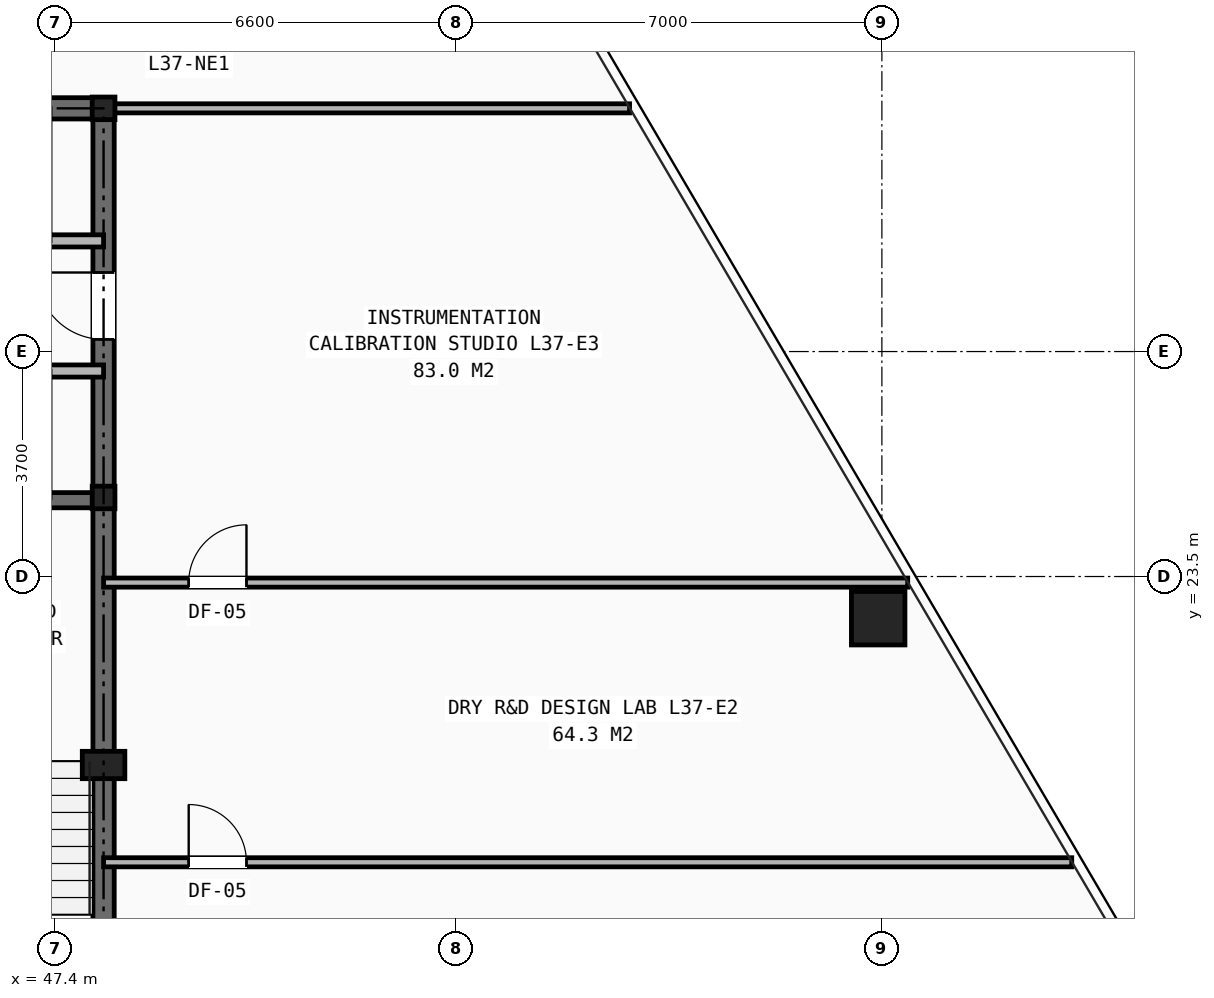
"""IFC4 building model, lengths in metres.
Left out: names, types, materials, properties, quantities, classifications, styles, units other than length and angle.
Written with IfcOpenShell. Run it as: python <this file> out.ifc"""

import sys

from ifc_helpers import new_model, si_unit, direction, frame, frame_2d, origin, origin_2d, place, context, subcontext, project, spatial, rectangle, hollow_rectangle, i_section, extrude, element, fill, save


model = new_model("IFC4")
c1 = context("Model", 3, precision=1e-05, world=origin(), true_north=direction((0.0, 1.0)))
c2 = subcontext(c1, "Body", "Model", "MODEL_VIEW")
j1 = project(units=[si_unit("LENGTHUNIT", "METRE"), si_unit("PLANEANGLEUNIT", "RADIAN")], contexts=[c1])
p1 = place(None, origin())
s1 = spatial("IfcSite", under=j1, at=p1, CompositionType="ELEMENT")
p2 = place(p1, origin())
s2 = spatial("IfcBuilding", under=s1, at=p2, CompositionType="ELEMENT")
p3 = place(p2, frame((0.0, 0.0, 129.8)))
s3 = spatial("IfcBuildingStorey", under=s2, at=p3, CompositionType="ELEMENT", Elevation=129.8)
for number, where, z_axis, x_axis in (
    (1, (48.2, 24.8, 0.0), (0.0, 0.0, 1.0), (1.0, 0.0, 0.0)),
    (2, (48.2, 31.2, 0.0), (0.0, 0.0, 1.0), (1.0, 0.0, 0.0)),
):
    element("IfcColumn", number, at=place(p3, frame(where, z_axis=z_axis, x_axis=x_axis)), inside=s3, PredefinedType="COLUMN", context=c2, shape_type="SweptSolid", body=[
        extrude(i_section(OverallWidth=0.374, OverallDepth=0.372, WebThickness=0.016, FlangeThickness=0.026, at=origin_2d()), origin(), (0.0, 0.0, 1.0), 3.45),
    ])
p4 = place(p3, frame((48.2, 20.4, 0.0), z_axis=(0.0, 0.0, 1.0), x_axis=(1.0, 0.0, 0.0)))
e3 = element("IfcColumn", 3, at=p4, inside=s3, PredefinedType="PILASTER", context=c2, shape_type="SweptSolid", body=[
    extrude(rectangle(XDim=0.7, YDim=0.45, at=origin_2d()), origin(), (0.0, 0.0, 1.0), 3.45),
])
p5 = place(p3, frame((60.939, 22.814, 0.0), z_axis=(0.0, 0.0, 1.0), x_axis=(1.0, 0.0, 0.0)))
e4 = element("IfcColumn", 4, at=p5, inside=s3, PredefinedType="COLUMN", context=c2, shape_type="SweptSolid", body=[
    extrude(hollow_rectangle(XDim=0.88, YDim=0.88, WallThickness=0.06, at=origin_2d()), origin(), (0.0, 0.0, 1.0), 3.45),
])
p6 = place(p3, frame((31.8, 31.2, 0.0), z_axis=(0.0, 0.0, 1.0), x_axis=(1.0, 0.0, 0.0)))
e5 = element("IfcWall", 5, at=p6, inside=s3, PredefinedType="SHEAR", context=c2, shape_type="SweptSolid", body=[
    extrude(rectangle(XDim=16.4, YDim=0.35, at=frame_2d((8.2, 0.0))), origin(), (0.0, 0.0, 1.0), 3.21),
])
p7 = place(p3, frame((48.2, 16.4, 0.0), z_axis=(0.0, 0.0, 1.0), x_axis=(0.0, 1.0, 0.0)))
e6 = element("IfcWall", 6, at=p7, inside=s3, PredefinedType="SHEAR", context=c2, shape_type="SweptSolid", body=[
    extrude(rectangle(XDim=14.8, YDim=0.35, at=frame_2d((7.4, 0.0))), origin(), (0.0, 0.0, 1.0), 3.21),
])
p8 = place(p7, frame((11.0, 0.0, 0.0)))
e7 = element("IfcOpeningElement", 7, at=p8, cuts=e6, PredefinedType="OPENING", context=c2, shape_type="SweptSolid", body=[
    extrude(rectangle(XDim=1.1, YDim=2.15, at=frame_2d((0.55, 1.075))), frame((0.0, 0.185, 0.0), z_axis=(0.0, -1.0, 0.0), x_axis=(1.0, 0.0, 0.0)), (0.0, 0.0, 1.0), 0.37),
])
p9 = place(p3, frame((44.955, 24.755, 0.0), z_axis=(0.0, 0.0, 1.0), x_axis=(1.0, 0.0, 0.0)))
e8 = element("IfcWall", 8, at=p9, inside=s3, PredefinedType="SHEAR", context=c2, shape_type="SweptSolid", body=[
    extrude(rectangle(XDim=3.245, YDim=0.25, at=frame_2d((1.623, 0.0))), origin(), (0.0, 0.0, 1.0), 3.21),
])
p10 = place(p3, frame((31.8, 29.02, 0.0), z_axis=(0.0, 0.0, 1.0), x_axis=(1.0, 0.0, 0.0)))
e9 = element("IfcWall", 9, at=p10, inside=s3, PredefinedType="SOLIDWALL", context=c2, shape_type="SweptSolid", body=[
    extrude(rectangle(XDim=16.4, YDim=0.2, at=frame_2d((8.2, 0.0))), origin(), (0.0, 0.0, 1.0), 2.661),
])
p11 = place(p10, frame((0.55, 0.0, 0.0)))
e10 = element("IfcOpeningElement", 10, at=p11, cuts=e9, PredefinedType="OPENING", context=c2, shape_type="SweptSolid", body=[
    extrude(rectangle(XDim=0.85, YDim=2.05, at=frame_2d((0.425, 1.025))), frame((0.0, 0.11, 0.0), z_axis=(0.0, -1.0, 0.0), x_axis=(1.0, 0.0, 0.0)), (0.0, 0.0, 1.0), 0.22),
])
p12 = place(p10, frame((5.94, 0.0, 0.0)))
e11 = element("IfcOpeningElement", 11, at=p12, cuts=e9, PredefinedType="OPENING", context=c2, shape_type="SweptSolid", body=[
    extrude(rectangle(XDim=0.9, YDim=2.1, at=frame_2d((0.45, 1.05))), frame((0.0, 0.11, 0.0), z_axis=(0.0, -1.0, 0.0), x_axis=(1.0, 0.0, 0.0)), (0.0, 0.0, 1.0), 0.22),
])
p13 = place(p3, frame((33.82, 26.88, 0.0), z_axis=(0.0, 0.0, 1.0), x_axis=(1.0, 0.0, 0.0)))
e12 = element("IfcWall", 12, at=p13, inside=s3, PredefinedType="SOLIDWALL", context=c2, shape_type="SweptSolid", body=[
    extrude(rectangle(XDim=14.38, YDim=0.2, at=frame_2d((7.19, 0.0))), origin(), (0.0, 0.0, 1.0), 2.661),
])
p14 = place(p13, frame((0.53, 0.0, 0.0)))
e13 = element("IfcOpeningElement", 13, at=p14, cuts=e12, PredefinedType="OPENING", context=c2, shape_type="SweptSolid", body=[
    extrude(rectangle(XDim=1.1, YDim=2.15, at=frame_2d((0.55, 1.075))), frame((0.0, 0.11, 0.0), z_axis=(0.0, -1.0, 0.0), x_axis=(1.0, 0.0, 0.0)), (0.0, 0.0, 1.0), 0.22),
])
p15 = place(p13, frame((2.69, 0.0, 0.0)))
e14 = element("IfcOpeningElement", 14, at=p15, cuts=e12, PredefinedType="OPENING", context=c2, shape_type="SweptSolid", body=[
    extrude(rectangle(XDim=1.1, YDim=2.15, at=frame_2d((0.55, 1.075))), frame((0.0, 0.11, 0.0), z_axis=(0.0, -1.0, 0.0), x_axis=(1.0, 0.0, 0.0)), (0.0, 0.0, 1.0), 0.22),
])
p16 = place(p13, frame((4.85, 0.0, 0.0)))
e15 = element("IfcOpeningElement", 15, at=p16, cuts=e12, PredefinedType="OPENING", context=c2, shape_type="SweptSolid", body=[
    extrude(rectangle(XDim=1.1, YDim=2.15, at=frame_2d((0.55, 1.075))), frame((0.0, 0.11, 0.0), z_axis=(0.0, -1.0, 0.0), x_axis=(1.0, 0.0, 0.0)), (0.0, 0.0, 1.0), 0.22),
])
p17 = place(p13, frame((7.01, 0.0, 0.0)))
e16 = element("IfcOpeningElement", 16, at=p17, cuts=e12, PredefinedType="OPENING", context=c2, shape_type="SweptSolid", body=[
    extrude(rectangle(XDim=1.1, YDim=2.15, at=frame_2d((0.55, 1.075))), frame((0.0, 0.11, 0.0), z_axis=(0.0, -1.0, 0.0), x_axis=(1.0, 0.0, 0.0)), (0.0, 0.0, 1.0), 0.22),
])
p18 = place(p3, frame((48.2, 31.2, 0.0), z_axis=(0.0, 0.0, 1.0), x_axis=(1.0, 0.0, 0.0)))
e17 = element("IfcWall", 17, at=p18, inside=s3, PredefinedType="PARTITIONING", context=c2, shape_type="SweptSolid", body=[
    extrude(rectangle(XDim=8.65, YDim=0.15, at=frame_2d((4.325, 0.0))), origin(), (0.0, 0.0, 1.0), 2.252),
])
p19 = place(p3, frame((48.2, 18.8, 0.0), z_axis=(0.0, 0.0, 1.0), x_axis=(1.0, 0.0, 0.0)))
e18 = element("IfcWall", 18, at=p19, inside=s3, PredefinedType="PARTITIONING", context=c2, shape_type="SweptSolid", body=[
    extrude(rectangle(XDim=15.922, YDim=0.15, at=frame_2d((7.961, 0.0))), origin(), (0.0, 0.0, 1.0), 2.589),
])
p20 = place(p19, frame((1.4, 0.0, 0.0)))
e19 = element("IfcOpeningElement", 19, at=p20, cuts=e18, PredefinedType="OPENING", context=c2, shape_type="SweptSolid", body=[
    extrude(rectangle(XDim=0.95, YDim=2.1, at=frame_2d((0.475, 1.05))), frame((0.0, 0.085, 0.0), z_axis=(0.0, -1.0, 0.0), x_axis=(1.0, 0.0, 0.0)), (0.0, 0.0, 1.0), 0.17),
])
p21 = place(p3, frame((48.2, 23.4, 0.0), z_axis=(0.0, 0.0, 1.0), x_axis=(1.0, 0.0, 0.0)))
e20 = element("IfcWall", 20, at=p21, inside=s3, PredefinedType="PARTITIONING", context=c2, shape_type="SweptSolid", body=[
    extrude(rectangle(XDim=13.225, YDim=0.15, at=frame_2d((6.612, 0.0))), origin(), (0.0, 0.0, 1.0), 2.589),
])
p22 = place(p21, frame((1.4, 0.0, 0.0)))
e21 = element("IfcOpeningElement", 21, at=p22, cuts=e20, PredefinedType="OPENING", context=c2, shape_type="SweptSolid", body=[
    extrude(rectangle(XDim=0.95, YDim=2.1, at=frame_2d((0.475, 1.05))), frame((0.0, 0.085, 0.0), z_axis=(0.0, -1.0, 0.0), x_axis=(1.0, 0.0, 0.0)), (0.0, 0.0, 1.0), 0.17),
])
p23 = place(p8, origin())
e22 = element("IfcDoor", 22, at=p23, inside=s3, OperationType="SINGLE_SWING_RIGHT", PredefinedType="DOOR", context=c2, shape_type="SweptSolid", body=[
    extrude(rectangle(XDim=1.1, YDim=2.15, at=frame_2d((0.55, 1.075))), frame((0.0, 0.025, 0.0), z_axis=(0.0, -1.0, 0.0), x_axis=(1.0, 0.0, 0.0)), (0.0, 0.0, 1.0), 0.05),
])
fill(e7, e22)
p24 = place(p20, origin())
e23 = element("IfcDoor", 23, at=p24, inside=s3, OperationType="SINGLE_SWING_LEFT", PredefinedType="DOOR", context=c2, shape_type="SweptSolid", body=[
    extrude(rectangle(XDim=0.95, YDim=2.1, at=frame_2d((0.475, 1.05))), frame((0.0, 0.025, 0.0), z_axis=(0.0, -1.0, 0.0), x_axis=(1.0, 0.0, 0.0)), (0.0, 0.0, 1.0), 0.05),
])
fill(e19, e23)
p25 = place(p22, origin())
e24 = element("IfcDoor", 24, at=p25, inside=s3, OperationType="SINGLE_SWING_RIGHT", PredefinedType="DOOR", context=c2, shape_type="SweptSolid", body=[
    extrude(rectangle(XDim=0.95, YDim=2.1, at=frame_2d((0.475, 1.05))), frame((0.0, 0.025, 0.0), z_axis=(0.0, -1.0, 0.0), x_axis=(1.0, 0.0, 0.0)), (0.0, 0.0, 1.0), 0.05),
])
fill(e21, e24)
save(model, sys.argv[1])
